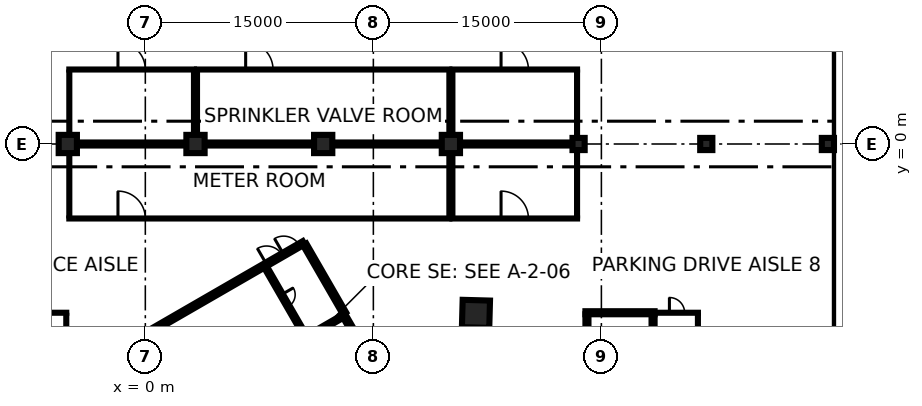
"""IFC4 building model, lengths in metres.
Left out: names, types, materials, properties, quantities, classifications, styles, units other than length and angle.
Written with IfcOpenShell. Run it as: python <this file> out.ifc"""

import sys

from ifc_helpers import new_model, si_unit, direction, frame, frame_2d, origin, origin_2d, place, context, subcontext, project, spatial, rectangle, extrude, element, fill, save


model = new_model("IFC4")
c1 = context("Model", 3, precision=1e-05, world=origin(), true_north=direction((0.0, 1.0)))
c2 = subcontext(c1, "Body", "Model", "MODEL_VIEW")
j1 = project(units=[si_unit("LENGTHUNIT", "METRE"), si_unit("PLANEANGLEUNIT", "RADIAN")], contexts=[c1])
p1 = place(None, origin())
s1 = spatial("IfcSite", under=j1, at=p1, CompositionType="ELEMENT")
p2 = place(p1, origin())
s2 = spatial("IfcBuilding", under=s1, at=p2, CompositionType="ELEMENT")
p3 = place(p2, frame((0.0, 0.0, -12.0)))
s3 = spatial("IfcBuildingStorey", under=s2, at=p3, CompositionType="ELEMENT", Elevation=-12.0)
p4 = place(p3, frame((45.75, -80.0, 0.0), z_axis=(0.0, 0.0, 1.0), x_axis=(0.0, 1.0, 0.0)))
e1 = element("IfcWall", 1, at=p4, inside=s3, PredefinedType="USERDEFINED", context=c2, shape_type="SweptSolid", body=[
    extrude(rectangle(XDim=160.0, YDim=0.9, at=frame_2d((80.0, 0.0))), origin(), (0.0, 0.0, 1.0), 11.55),
])
p5 = place(p2, frame((0.0, 0.0, -7.2)))
s4 = spatial("IfcBuildingStorey", under=s2, at=p5, CompositionType="ELEMENT", Elevation=-7.2)
p6 = place(p5, frame((21.749, -11.174, -0.4), z_axis=(0.0, 0.0, 1.0), x_axis=(-0.999628128016, 0.02726913418, 0.0)))
e2 = element("IfcColumn", 2, at=p6, inside=s4, PredefinedType="COLUMN", context=c2, shape_type="SweptSolid", body=[
    extrude(rectangle(XDim=1.8, YDim=1.8, at=origin_2d()), origin(), (0.0, 0.0, 1.0), 3.6),
])
for number, where, z_axis, x_axis in (
    (3, (-5.1, 0.0, -0.4), (0.0, 0.0, 1.0), (1.0, 0.0, 0.0)),
    (4, (3.3, 0.0, -0.4), (0.0, 0.0, 1.0), (1.0, 0.0, 0.0)),
    (5, (11.7, 0.0, -0.4), (0.0, 0.0, 1.0), (1.0, 0.0, 0.0)),
    (6, (20.1, 0.0, -0.4), (0.0, 0.0, 1.0), (1.0, 0.0, 0.0)),
):
    element("IfcColumn", number, at=place(p5, frame(where, z_axis=z_axis, x_axis=x_axis)), inside=s4, PredefinedType="COLUMN", context=c2, shape_type="SweptSolid", body=[
        extrude(rectangle(XDim=1.2, YDim=1.2, at=origin_2d()), origin(), (0.0, 0.0, 1.0), 3.6),
    ])
for number, where, z_axis, x_axis in (
    (7, (28.5, 0.0, -0.4), (0.0, 0.0, 1.0), (1.0, 0.0, 0.0)),
    (8, (36.9, 0.0, -0.4), (0.0, 0.0, 1.0), (1.0, 0.0, 0.0)),
    (9, (44.9, 0.0, -0.4), (0.0, 0.0, 1.0), (1.0, 0.0, 0.0)),
):
    element("IfcColumn", number, at=place(p5, frame(where, z_axis=z_axis, x_axis=x_axis)), inside=s4, PredefinedType="COLUMN", context=c2, shape_type="SweptSolid", body=[
        extrude(rectangle(XDim=0.8, YDim=0.8, at=origin_2d()), origin(), (0.0, 0.0, 1.0), 3.6),
    ])
p7 = place(p5, frame((0.417, -12.273, 0.0), z_axis=(0.0, 0.0, 1.0), x_axis=(0.866021906294, 0.500006057782, 0.0)))
e10 = element("IfcWall", 10, at=p7, inside=s4, PredefinedType="SHEAR", context=c2, shape_type="SweptSolid", body=[
    extrude(rectangle(XDim=11.55, YDim=0.25, at=frame_2d((5.775, 0.0))), origin(), (0.0, 0.0, 1.0), 3.2),
])
p8 = place(p7, frame((10.025, 0.0, 0.0)))
e11 = element("IfcOpeningElement", 11, at=p8, cuts=e10, PredefinedType="OPENING", context=c2, shape_type="SweptSolid", body=[
    extrude(rectangle(XDim=1.2, YDim=2.1, at=frame_2d((0.6, 1.05))), frame((0.0, 0.135, 0.0), z_axis=(0.0, -1.0, 0.0), x_axis=(1.0, 0.0, 0.0)), (0.0, 0.0, 1.0), 0.27),
])
p9 = place(p7, frame((8.725, 0.0, 0.0)))
e12 = element("IfcOpeningElement", 12, at=p9, cuts=e10, PredefinedType="OPENING", context=c2, shape_type="SweptSolid", body=[
    extrude(rectangle(XDim=1.2, YDim=2.1, at=frame_2d((0.6, 1.05))), frame((0.0, 0.135, 0.0), z_axis=(0.0, -1.0, 0.0), x_axis=(1.0, 0.0, 0.0)), (0.0, 0.0, 1.0), 0.27),
])
p10 = place(p5, frame((13.008, -11.181, 0.0), z_axis=(0.0, 0.0, 1.0), x_axis=(0.500004234368, -0.866022959057, 0.0)))
e13 = element("IfcWall", 13, at=p10, inside=s4, PredefinedType="SHEAR", context=c2, shape_type="SweptSolid", body=[
    extrude(rectangle(XDim=6.25, YDim=0.25, at=frame_2d((3.125, 0.0))), origin(), (0.0, 0.0, 1.0), 3.2),
])
p11 = place(p5, frame((10.483, -6.606, 0.0), z_axis=(0.0, 0.0, 1.0), x_axis=(0.49999885962, -0.866026062182, 0.0)))
e14 = element("IfcWall", 14, at=p11, inside=s4, PredefinedType="SHEAR", context=c2, shape_type="SweptSolid", body=[
    extrude(rectangle(XDim=5.225, YDim=0.25, at=frame_2d((2.612, 0.0))), origin(), (0.0, 0.0, 1.0), 3.2),
])
p12 = place(p5, frame((7.906, -8.094, 0.0), z_axis=(0.0, 0.0, 1.0), x_axis=(0.500012186204, -0.866018367962, 0.0)))
e15 = element("IfcWall", 15, at=p12, inside=s4, PredefinedType="SHEAR", context=c2, shape_type="SweptSolid", body=[
    extrude(rectangle(XDim=5.349, YDim=0.2, at=frame_2d((2.674, 0.0))), origin(), (0.0, 0.0, 1.0), 3.2),
])
p13 = place(p12, frame((2.099, 0.0, 0.0)))
e16 = element("IfcOpeningElement", 16, at=p13, cuts=e15, PredefinedType="OPENING", context=c2, shape_type="SweptSolid", body=[
    extrude(rectangle(XDim=0.9, YDim=2.1, at=frame_2d((0.45, 1.05))), frame((0.0, 0.11, 0.0), z_axis=(0.0, -1.0, 0.0), x_axis=(1.0, 0.0, 0.0)), (0.0, 0.0, 1.0), 0.22),
])
p14 = place(p5, frame((10.668, -12.677, 0.0), z_axis=(0.0, 0.0, 1.0), x_axis=(0.866016748302, 0.500014991436, 0.0)))
e17 = element("IfcWall", 17, at=p14, inside=s4, PredefinedType="SHEAR", context=c2, shape_type="SweptSolid", body=[
    extrude(rectangle(XDim=2.649, YDim=0.2, at=frame_2d((1.324, 0.0))), origin(), (0.0, 0.0, 1.0), 3.2),
])
p15 = place(p14, frame((0.65, 0.0, 0.0)))
e18 = element("IfcOpeningElement", 18, at=p15, cuts=e17, PredefinedType="OPENING", context=c2, shape_type="SweptSolid", body=[
    extrude(rectangle(XDim=1.3, YDim=2.1, at=frame_2d((0.65, 1.05))), frame((0.0, 0.11, 0.0), z_axis=(0.0, -1.0, 0.0), x_axis=(1.0, 0.0, 0.0)), (0.0, 0.0, 1.0), 0.22),
])
p16 = place(p5, frame((-13.5, -11.1, 0.0), z_axis=(0.0, 0.0, 1.0), x_axis=(1.0, 0.0, 0.0)))
e19 = element("IfcWall", 19, at=p16, inside=s4, PredefinedType="PARTITIONING", context=c2, shape_type="SweptSolid", body=[
    extrude(rectangle(XDim=8.4, YDim=0.2, at=frame_2d((4.2, 0.0))), origin(), (0.0, 0.0, 1.0), 3.2),
])
p17 = place(p16, frame((3.7, 0.0, 0.0)))
e20 = element("IfcOpeningElement", 20, at=p17, cuts=e19, PredefinedType="OPENING", context=c2, shape_type="SweptSolid", body=[
    extrude(rectangle(XDim=1.0, YDim=2.1, at=frame_2d((0.5, 1.05))), frame((0.0, 0.11, 0.0), z_axis=(0.0, -1.0, 0.0), x_axis=(1.0, 0.0, 0.0)), (0.0, 0.0, 1.0), 0.22),
])
p18 = place(p5, frame((-5.2, -15.4, 0.0), z_axis=(0.0, 0.0, 1.0), x_axis=(0.0, 1.0, 0.0)))
e21 = element("IfcWall", 21, at=p18, inside=s4, PredefinedType="PARTITIONING", context=c2, shape_type="SweptSolid", body=[
    extrude(rectangle(XDim=4.2, YDim=0.2, at=frame_2d((2.1, 0.0))), origin(), (0.0, 0.0, 1.0), 3.2),
])
p19 = place(p5, frame((-5.1, -4.9, 0.0), z_axis=(0.0, 0.0, 1.0), x_axis=(1.0, 0.0, 0.0)))
e22 = element("IfcWall", 22, at=p19, inside=s4, PredefinedType="PARTITIONING", context=c2, shape_type="SweptSolid", body=[
    extrude(rectangle(XDim=25.2, YDim=0.2, at=frame_2d((12.6, 0.0))), origin(), (0.0, 0.0, 1.0), 3.2),
])
p20 = place(p19, frame((3.3, 0.0, 0.0)))
e23 = element("IfcOpeningElement", 23, at=p20, cuts=e22, PredefinedType="OPENING", context=c2, shape_type="SweptSolid", body=[
    extrude(rectangle(XDim=1.8, YDim=2.1, at=frame_2d((0.9, 1.05))), frame((0.0, 0.11, 0.0), z_axis=(0.0, -1.0, 0.0), x_axis=(1.0, 0.0, 0.0)), (0.0, 0.0, 1.0), 0.22),
])
p21 = place(p5, frame((-5.1, -0.1, 0.0), z_axis=(0.0, 0.0, 1.0), x_axis=(1.0, 0.0, 0.0)))
e24 = element("IfcWall", 24, at=p21, inside=s4, PredefinedType="PARTITIONING", context=c2, shape_type="SweptSolid", body=[
    extrude(rectangle(XDim=25.2, YDim=0.2, at=frame_2d((12.6, 0.0))), origin(), (0.0, 0.0, 1.0), 3.2),
])
for number, where, z_axis, x_axis in (
    (25, (-5.0, -4.8, 0.0), (0.0, 0.0, 1.0), (0.0, 1.0, 0.0)),
    (26, (20.0, -4.8, 0.0), (0.0, 0.0, 1.0), (0.0, 1.0, 0.0)),
):
    element("IfcWall", number, at=place(p5, frame(where, z_axis=z_axis, x_axis=x_axis)), inside=s4, PredefinedType="PARTITIONING", context=c2, shape_type="SweptSolid", body=[
        extrude(rectangle(XDim=4.2, YDim=0.2, at=frame_2d((2.1, 0.0))), origin(), (0.0, 0.0, 1.0), 3.2),
    ])
p22 = place(p5, frame((20.1, -4.9, 0.0), z_axis=(0.0, 0.0, 1.0), x_axis=(1.0, 0.0, 0.0)))
e27 = element("IfcWall", 27, at=p22, inside=s4, PredefinedType="PARTITIONING", context=c2, shape_type="SweptSolid", body=[
    extrude(rectangle(XDim=8.4, YDim=0.2, at=frame_2d((4.2, 0.0))), origin(), (0.0, 0.0, 1.0), 3.2),
])
p23 = place(p22, frame((3.3, 0.0, 0.0)))
e28 = element("IfcOpeningElement", 28, at=p23, cuts=e27, PredefinedType="OPENING", context=c2, shape_type="SweptSolid", body=[
    extrude(rectangle(XDim=1.8, YDim=2.1, at=frame_2d((0.9, 1.05))), frame((0.0, 0.11, 0.0), z_axis=(0.0, -1.0, 0.0), x_axis=(1.0, 0.0, 0.0)), (0.0, 0.0, 1.0), 0.22),
])
p24 = place(p5, frame((20.1, -0.1, 0.0), z_axis=(0.0, 0.0, 1.0), x_axis=(1.0, 0.0, 0.0)))
e29 = element("IfcWall", 29, at=p24, inside=s4, PredefinedType="PARTITIONING", context=c2, shape_type="SweptSolid", body=[
    extrude(rectangle(XDim=8.4, YDim=0.2, at=frame_2d((4.2, 0.0))), origin(), (0.0, 0.0, 1.0), 3.2),
])
p25 = place(p5, frame((20.2, -4.8, 0.0), z_axis=(0.0, 0.0, 1.0), x_axis=(0.0, 1.0, 0.0)))
e30 = element("IfcWall", 30, at=p25, inside=s4, PredefinedType="PARTITIONING", context=c2, shape_type="SweptSolid", body=[
    extrude(rectangle(XDim=4.2, YDim=0.2, at=frame_2d((2.1, 0.0))), origin(), (0.0, 0.0, 1.0), 3.2),
])
p26 = place(p5, frame((28.4, -4.8, 0.0), z_axis=(0.0, 0.0, 1.0), x_axis=(0.0, 1.0, 0.0)))
e31 = element("IfcWall", 31, at=p26, inside=s4, PredefinedType="PARTITIONING", context=c2, shape_type="SweptSolid", body=[
    extrude(rectangle(XDim=4.4, YDim=0.2, at=frame_2d((2.2, 0.0))), origin(), (0.0, 0.0, 1.0), 3.2),
])
p27 = place(p5, frame((-5.1, 0.1, 0.0), z_axis=(0.0, 0.0, 1.0), x_axis=(1.0, 0.0, 0.0)))
e32 = element("IfcWall", 32, at=p27, inside=s4, PredefinedType="PARTITIONING", context=c2, shape_type="SweptSolid", body=[
    extrude(rectangle(XDim=8.4, YDim=0.2, at=frame_2d((4.2, 0.0))), origin(), (0.0, 0.0, 1.0), 3.2),
])
p28 = place(p5, frame((-5.1, 4.9, 0.0), z_axis=(0.0, 0.0, 1.0), x_axis=(1.0, 0.0, 0.0)))
e33 = element("IfcWall", 33, at=p28, inside=s4, PredefinedType="PARTITIONING", context=c2, shape_type="SweptSolid", body=[
    extrude(rectangle(XDim=8.4, YDim=0.2, at=frame_2d((4.2, 0.0))), origin(), (0.0, 0.0, 1.0), 3.2),
])
p29 = place(p28, frame((3.3, 0.0, 0.0)))
e34 = element("IfcOpeningElement", 34, at=p29, cuts=e33, PredefinedType="OPENING", context=c2, shape_type="SweptSolid", body=[
    extrude(rectangle(XDim=1.8, YDim=2.1, at=frame_2d((0.9, 1.05))), frame((0.0, 0.11, 0.0), z_axis=(0.0, -1.0, 0.0), x_axis=(1.0, 0.0, 0.0)), (0.0, 0.0, 1.0), 0.22),
])
for number, where, z_axis, x_axis in (
    (35, (-5.0, 0.6, 0.0), (0.0, 0.0, 1.0), (0.0, 1.0, 0.0)),
    (36, (3.2, 0.6, 0.0), (0.0, 0.0, 1.0), (0.0, 1.0, 0.0)),
):
    element("IfcWall", number, at=place(p5, frame(where, z_axis=z_axis, x_axis=x_axis)), inside=s4, PredefinedType="PARTITIONING", context=c2, shape_type="SweptSolid", body=[
        extrude(rectangle(XDim=4.2, YDim=0.2, at=frame_2d((2.1, 0.0))), origin(), (0.0, 0.0, 1.0), 3.2),
    ])
p30 = place(p5, frame((3.3, 0.1, 0.0), z_axis=(0.0, 0.0, 1.0), x_axis=(1.0, 0.0, 0.0)))
e37 = element("IfcWall", 37, at=p30, inside=s4, PredefinedType="PARTITIONING", context=c2, shape_type="SweptSolid", body=[
    extrude(rectangle(XDim=16.8, YDim=0.2, at=frame_2d((8.4, 0.0))), origin(), (0.0, 0.0, 1.0), 3.2),
])
p31 = place(p5, frame((3.3, 4.9, 0.0), z_axis=(0.0, 0.0, 1.0), x_axis=(1.0, 0.0, 0.0)))
e38 = element("IfcWall", 38, at=p31, inside=s4, PredefinedType="PARTITIONING", context=c2, shape_type="SweptSolid", body=[
    extrude(rectangle(XDim=16.8, YDim=0.2, at=frame_2d((8.4, 0.0))), origin(), (0.0, 0.0, 1.0), 3.2),
])
p32 = place(p31, frame((3.3, 0.0, 0.0)))
e39 = element("IfcOpeningElement", 39, at=p32, cuts=e38, PredefinedType="OPENING", context=c2, shape_type="SweptSolid", body=[
    extrude(rectangle(XDim=1.8, YDim=2.1, at=frame_2d((0.9, 1.05))), frame((0.0, 0.11, 0.0), z_axis=(0.0, -1.0, 0.0), x_axis=(1.0, 0.0, 0.0)), (0.0, 0.0, 1.0), 0.22),
])
for number, where, z_axis, x_axis in (
    (40, (3.4, 0.6, 0.0), (0.0, 0.0, 1.0), (0.0, 1.0, 0.0)),
    (41, (20.0, 0.6, 0.0), (0.0, 0.0, 1.0), (0.0, 1.0, 0.0)),
):
    element("IfcWall", number, at=place(p5, frame(where, z_axis=z_axis, x_axis=x_axis)), inside=s4, PredefinedType="PARTITIONING", context=c2, shape_type="SweptSolid", body=[
        extrude(rectangle(XDim=4.2, YDim=0.2, at=frame_2d((2.1, 0.0))), origin(), (0.0, 0.0, 1.0), 3.2),
    ])
p33 = place(p5, frame((20.1, 0.1, 0.0), z_axis=(0.0, 0.0, 1.0), x_axis=(1.0, 0.0, 0.0)))
e42 = element("IfcWall", 42, at=p33, inside=s4, PredefinedType="PARTITIONING", context=c2, shape_type="SweptSolid", body=[
    extrude(rectangle(XDim=8.4, YDim=0.2, at=frame_2d((4.2, 0.0))), origin(), (0.0, 0.0, 1.0), 3.2),
])
p34 = place(p5, frame((20.1, 4.9, 0.0), z_axis=(0.0, 0.0, 1.0), x_axis=(1.0, 0.0, 0.0)))
e43 = element("IfcWall", 43, at=p34, inside=s4, PredefinedType="PARTITIONING", context=c2, shape_type="SweptSolid", body=[
    extrude(rectangle(XDim=8.4, YDim=0.2, at=frame_2d((4.2, 0.0))), origin(), (0.0, 0.0, 1.0), 3.2),
])
p35 = place(p34, frame((3.3, 0.0, 0.0)))
e44 = element("IfcOpeningElement", 44, at=p35, cuts=e43, PredefinedType="OPENING", context=c2, shape_type="SweptSolid", body=[
    extrude(rectangle(XDim=1.8, YDim=2.1, at=frame_2d((0.9, 1.05))), frame((0.0, 0.11, 0.0), z_axis=(0.0, -1.0, 0.0), x_axis=(1.0, 0.0, 0.0)), (0.0, 0.0, 1.0), 0.22),
])
p36 = place(p5, frame((20.2, 0.6, 0.0), z_axis=(0.0, 0.0, 1.0), x_axis=(0.0, 1.0, 0.0)))
e45 = element("IfcWall", 45, at=p36, inside=s4, PredefinedType="PARTITIONING", context=c2, shape_type="SweptSolid", body=[
    extrude(rectangle(XDim=4.2, YDim=0.2, at=frame_2d((2.1, 0.0))), origin(), (0.0, 0.0, 1.0), 3.2),
])
p37 = place(p5, frame((28.4, 0.4, 0.0), z_axis=(0.0, 0.0, 1.0), x_axis=(0.0, 1.0, 0.0)))
e46 = element("IfcWall", 46, at=p37, inside=s4, PredefinedType="PARTITIONING", context=c2, shape_type="SweptSolid", body=[
    extrude(rectangle(XDim=4.4, YDim=0.2, at=frame_2d((2.2, 0.0))), origin(), (0.0, 0.0, 1.0), 3.2),
])
p38 = place(p5, frame((33.5, -11.1, 0.0), z_axis=(0.0, 0.0, 1.0), x_axis=(1.0, 0.0, 0.0)))
e47 = element("IfcWall", 47, at=p38, inside=s4, PredefinedType="PARTITIONING", context=c2, shape_type="SweptSolid", body=[
    extrude(rectangle(XDim=2.95, YDim=0.2, at=frame_2d((1.475, 0.0))), origin(), (0.0, 0.0, 1.0), 3.2),
])
p39 = place(p38, frame((0.975, 0.0, 0.0)))
e48 = element("IfcOpeningElement", 48, at=p39, cuts=e47, PredefinedType="OPENING", context=c2, shape_type="SweptSolid", body=[
    extrude(rectangle(XDim=1.0, YDim=2.1, at=frame_2d((0.5, 1.05))), frame((0.0, 0.11, 0.0), z_axis=(0.0, -1.0, 0.0), x_axis=(1.0, 0.0, 0.0)), (0.0, 0.0, 1.0), 0.22),
])
p40 = place(p5, frame((36.35, -16.8, 0.0), z_axis=(0.0, 0.0, 1.0), x_axis=(0.0, 1.0, 0.0)))
e49 = element("IfcWall", 49, at=p40, inside=s4, PredefinedType="PARTITIONING", context=c2, shape_type="SweptSolid", body=[
    extrude(rectangle(XDim=5.6, YDim=0.2, at=frame_2d((2.8, 0.0))), origin(), (0.0, 0.0, 1.0), 3.2),
])
p41 = place(p5, frame((29.05, -20.8, 0.0), z_axis=(0.0, 0.0, 1.0), x_axis=(0.0, 1.0, 0.0)))
e50 = element("IfcWall", 50, at=p41, inside=s4, PredefinedType="SOLIDWALL", context=c2, shape_type="SweptSolid", body=[
    extrude(rectangle(XDim=9.6, YDim=0.2, at=frame_2d((4.8, 0.0))), origin(), (0.0, 0.0, 1.0), 3.2),
])
p42 = place(p5, frame((33.4, -20.8, 0.0), z_axis=(0.0, 0.0, 1.0), x_axis=(0.0, 1.0, 0.0)))
e51 = element("IfcWall", 51, at=p42, inside=s4, PredefinedType="SOLIDWALL", context=c2, shape_type="SweptSolid", body=[
    extrude(rectangle(XDim=9.6, YDim=0.2, at=frame_2d((4.8, 0.0))), origin(), (0.0, 0.0, 1.0), 3.2),
])
p43 = place(p42, frame((0.4, 0.0, 0.0)))
e52 = element("IfcOpeningElement", 52, at=p43, cuts=e51, PredefinedType="OPENING", context=c2, shape_type="SweptSolid", body=[
    extrude(rectangle(XDim=1.2, YDim=2.1, at=frame_2d((0.6, 1.05))), frame((0.0, 0.11, 0.0), z_axis=(0.0, -1.0, 0.0), x_axis=(1.0, 0.0, 0.0)), (0.0, 0.0, 1.0), 0.22),
])
p44 = place(p5, frame((28.95, -11.1, 0.0), z_axis=(0.0, 0.0, 1.0), x_axis=(1.0, 0.0, 0.0)))
e53 = element("IfcWall", 53, at=p44, inside=s4, PredefinedType="SOLIDWALL", context=c2, shape_type="SweptSolid", body=[
    extrude(rectangle(XDim=4.55, YDim=0.2, at=frame_2d((2.275, 0.0))), origin(), (0.0, 0.0, 1.0), 3.2),
])
p45 = place(p15, origin())
e54 = element("IfcDoor", 54, at=p45, inside=s4, OperationType="SLIDING_TO_RIGHT", PredefinedType="DOOR", context=c2, shape_type="SweptSolid", body=[
    extrude(rectangle(XDim=1.3, YDim=2.1, at=frame_2d((0.65, 1.05))), frame((0.0, 0.025, 0.0), z_axis=(0.0, -1.0, 0.0), x_axis=(1.0, 0.0, 0.0)), (0.0, 0.0, 1.0), 0.05),
])
fill(e18, e54)
p46 = place(p8, origin())
e55 = element("IfcDoor", 55, at=p46, inside=s4, OperationType="SINGLE_SWING_LEFT", PredefinedType="DOOR", context=c2, shape_type="SweptSolid", body=[
    extrude(rectangle(XDim=1.2, YDim=2.1, at=frame_2d((0.6, 1.05))), frame((0.0, 0.025, 0.0), z_axis=(0.0, -1.0, 0.0), x_axis=(1.0, 0.0, 0.0)), (0.0, 0.0, 1.0), 0.05),
])
fill(e11, e55)
p47 = place(p9, origin())
e56 = element("IfcDoor", 56, at=p47, inside=s4, OperationType="SINGLE_SWING_RIGHT", PredefinedType="DOOR", context=c2, shape_type="SweptSolid", body=[
    extrude(rectangle(XDim=1.2, YDim=2.1, at=frame_2d((0.6, 1.05))), frame((0.0, 0.025, 0.0), z_axis=(0.0, -1.0, 0.0), x_axis=(1.0, 0.0, 0.0)), (0.0, 0.0, 1.0), 0.05),
])
fill(e12, e56)
p48 = place(p13, origin())
e57 = element("IfcDoor", 57, at=p48, inside=s4, OperationType="SINGLE_SWING_RIGHT", PredefinedType="DOOR", context=c2, shape_type="SweptSolid", body=[
    extrude(rectangle(XDim=0.9, YDim=2.1, at=frame_2d((0.45, 1.05))), frame((0.0, 0.025, 0.0), z_axis=(0.0, -1.0, 0.0), x_axis=(1.0, 0.0, 0.0)), (0.0, 0.0, 1.0), 0.05),
])
fill(e16, e57)
p49 = place(p20, origin())
e58 = element("IfcDoor", 58, at=p49, inside=s4, OperationType="DOUBLE_DOOR_SINGLE_SWING", PredefinedType="DOOR", context=c2, shape_type="SweptSolid", body=[
    extrude(rectangle(XDim=1.8, YDim=2.1, at=frame_2d((0.9, 1.05))), frame((0.0, 0.025, 0.0), z_axis=(0.0, -1.0, 0.0), x_axis=(1.0, 0.0, 0.0)), (0.0, 0.0, 1.0), 0.05),
])
fill(e23, e58)
p50 = place(p23, origin())
e59 = element("IfcDoor", 59, at=p50, inside=s4, OperationType="DOUBLE_DOOR_SINGLE_SWING", PredefinedType="DOOR", context=c2, shape_type="SweptSolid", body=[
    extrude(rectangle(XDim=1.8, YDim=2.1, at=frame_2d((0.9, 1.05))), frame((0.0, 0.025, 0.0), z_axis=(0.0, -1.0, 0.0), x_axis=(1.0, 0.0, 0.0)), (0.0, 0.0, 1.0), 0.05),
])
fill(e28, e59)
p51 = place(p29, origin())
e60 = element("IfcDoor", 60, at=p51, inside=s4, OperationType="DOUBLE_DOOR_SINGLE_SWING", PredefinedType="DOOR", context=c2, shape_type="SweptSolid", body=[
    extrude(rectangle(XDim=1.8, YDim=2.1, at=frame_2d((0.9, 1.05))), frame((0.0, 0.025, 0.0), z_axis=(0.0, -1.0, 0.0), x_axis=(1.0, 0.0, 0.0)), (0.0, 0.0, 1.0), 0.05),
])
fill(e34, e60)
p52 = place(p32, origin())
e61 = element("IfcDoor", 61, at=p52, inside=s4, OperationType="DOUBLE_DOOR_SINGLE_SWING", PredefinedType="DOOR", context=c2, shape_type="SweptSolid", body=[
    extrude(rectangle(XDim=1.8, YDim=2.1, at=frame_2d((0.9, 1.05))), frame((0.0, 0.025, 0.0), z_axis=(0.0, -1.0, 0.0), x_axis=(1.0, 0.0, 0.0)), (0.0, 0.0, 1.0), 0.05),
])
fill(e39, e61)
p53 = place(p35, origin())
e62 = element("IfcDoor", 62, at=p53, inside=s4, OperationType="DOUBLE_DOOR_SINGLE_SWING", PredefinedType="DOOR", context=c2, shape_type="SweptSolid", body=[
    extrude(rectangle(XDim=1.8, YDim=2.1, at=frame_2d((0.9, 1.05))), frame((0.0, 0.025, 0.0), z_axis=(0.0, -1.0, 0.0), x_axis=(1.0, 0.0, 0.0)), (0.0, 0.0, 1.0), 0.05),
])
fill(e44, e62)
p54 = place(p39, origin())
e63 = element("IfcDoor", 63, at=p54, inside=s4, OperationType="SINGLE_SWING_LEFT", PredefinedType="DOOR", context=c2, shape_type="SweptSolid", body=[
    extrude(rectangle(XDim=1.0, YDim=2.1, at=frame_2d((0.5, 1.05))), frame((0.0, 0.025, 0.0), z_axis=(0.0, -1.0, 0.0), x_axis=(1.0, 0.0, 0.0)), (0.0, 0.0, 1.0), 0.05),
])
fill(e48, e63)
save(model, sys.argv[1])
